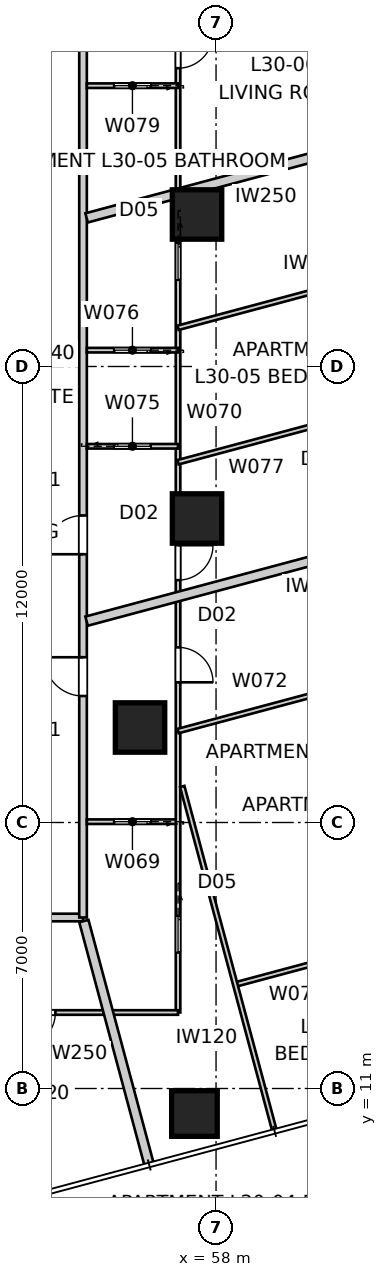
"""IFC4 building model, lengths in metres.
Left out: names, types, materials, properties, quantities, classifications, styles, units other than length and angle.
Written with IfcOpenShell. Run it as: python <this file> out.ifc"""

import sys

from ifc_helpers import new_model, si_unit, direction, frame, frame_2d, origin, origin_2d, place, context, subcontext, project, spatial, rectangle, extrude, element, fill, save


model = new_model("IFC4")
c1 = context("Model", 3, precision=1e-05, world=origin(), true_north=direction((0.0, 1.0)))
c2 = subcontext(c1, "Body", "Model", "MODEL_VIEW")
j1 = project(units=[si_unit("LENGTHUNIT", "METRE"), si_unit("PLANEANGLEUNIT", "RADIAN")], contexts=[c1])
p1 = place(None, origin())
s1 = spatial("IfcSite", under=j1, at=p1, CompositionType="ELEMENT")
p2 = place(p1, origin())
s2 = spatial("IfcBuilding", under=s1, at=p2, CompositionType="ELEMENT")
p3 = place(p2, frame((0.0, 0.0, 111.6)))
s3 = spatial("IfcBuildingStorey", under=s2, at=p3, CompositionType="ELEMENT", Elevation=111.6)
p4 = place(p3, frame((57.432, 10.342, -0.15), z_axis=(0.0, 0.0, 1.0), x_axis=(1.0, 0.0, 0.0)))
e1 = element("IfcColumn", 1, at=p4, inside=s3, PredefinedType="COLUMN", context=c2, shape_type="SweptSolid", body=[
    extrude(rectangle(XDim=1.2, YDim=1.2, at=origin_2d()), origin(), (0.0, 0.0, 1.0), 3.55),
])
for number, where, z_axis, x_axis in (
    (2, (57.5, 26.0, 0.0), (0.0, 0.0, 1.0), (1.0, 0.0, 0.0)),
    (3, (57.5, 34.0, 0.0), (0.0, 0.0, 1.0), (1.0, 0.0, 0.0)),
    (4, (56.0, 20.5, 0.0), (0.0, 0.0, 1.0), (1.0, 0.0, 0.0)),
):
    element("IfcColumn", number, at=place(p3, frame(where, z_axis=z_axis, x_axis=x_axis)), inside=s3, PredefinedType="COLUMN", context=c2, shape_type="SweptSolid", body=[
        extrude(rectangle(XDim=1.3, YDim=1.3, at=origin_2d()), origin(), (0.0, 0.0, 1.0), 3.4),
    ])
p5 = place(p3, frame((26.3, 15.5, 0.0), z_axis=(0.0, 0.0, 1.0), x_axis=(1.0, 0.0, 0.0)))
e5 = element("IfcWall", 5, at=p5, inside=s3, PredefinedType="PARTITIONING", context=c2, shape_type="SweptSolid", body=[
    extrude(rectangle(XDim=28.2, YDim=0.2, at=frame_2d((14.1, 0.0))), origin(), (0.0, 0.0, 1.0), 3.25),
])
p6 = place(p5, frame((21.474, 0.0, 0.0)))
e6 = element("IfcOpeningElement", 6, at=p6, cuts=e5, PredefinedType="OPENING", context=c2, shape_type="SweptSolid", body=[
    extrude(rectangle(XDim=1.02, YDim=2.34, at=frame_2d((0.51, 1.17))), frame((0.0, 0.11, 0.0), z_axis=(0.0, -1.0, 0.0), x_axis=(1.0, 0.0, 0.0)), (0.0, 0.0, 1.0), 0.22),
])
p7 = place(p5, frame((1.353, 0.0, 0.0)))
e7 = element("IfcOpeningElement", 7, at=p7, cuts=e5, PredefinedType="OPENING", context=c2, shape_type="SweptSolid", body=[
    extrude(rectangle(XDim=1.02, YDim=2.1, at=frame_2d((0.51, 1.05))), frame((0.0, 0.11, 0.0), z_axis=(0.0, -1.0, 0.0), x_axis=(1.0, 0.0, 0.0)), (0.0, 0.0, 1.0), 0.22),
])
p8 = place(p3, frame((54.5, 15.5, 0.0), z_axis=(0.0, 0.0, 1.0), x_axis=(0.0, 1.0, 0.0)))
e8 = element("IfcWall", 8, at=p8, inside=s3, PredefinedType="PARTITIONING", context=c2, shape_type="SweptSolid", body=[
    extrude(rectangle(XDim=29.0, YDim=0.2, at=frame_2d((14.5, 0.0))), origin(), (0.0, 0.0, 1.0), 3.25),
])
p9 = place(p8, frame((24.76, 0.0, 0.0)))
e9 = element("IfcOpeningElement", 9, at=p9, cuts=e8, PredefinedType="OPENING", context=c2, shape_type="SweptSolid", body=[
    extrude(rectangle(XDim=1.02, YDim=2.1, at=frame_2d((0.51, 1.05))), frame((0.0, 0.11, 0.0), z_axis=(0.0, -1.0, 0.0), x_axis=(1.0, 0.0, 0.0)), (0.0, 0.0, 1.0), 0.22),
])
p10 = place(p8, frame((5.829, 0.0, 0.0)))
e10 = element("IfcOpeningElement", 10, at=p10, cuts=e8, PredefinedType="OPENING", context=c2, shape_type="SweptSolid", body=[
    extrude(rectangle(XDim=1.02, YDim=2.34, at=frame_2d((0.51, 1.17))), frame((0.0, 0.11, 0.0), z_axis=(0.0, -1.0, 0.0), x_axis=(1.0, 0.0, 0.0)), (0.0, 0.0, 1.0), 0.22),
])
p11 = place(p8, frame((9.559, 0.0, 0.0)))
e11 = element("IfcOpeningElement", 11, at=p11, cuts=e8, PredefinedType="OPENING", context=c2, shape_type="SweptSolid", body=[
    extrude(rectangle(XDim=1.02, YDim=2.34, at=frame_2d((0.51, 1.17))), frame((0.0, 0.11, 0.0), z_axis=(0.0, -1.0, 0.0), x_axis=(1.0, 0.0, 0.0)), (0.0, 0.0, 1.0), 0.22),
])
p12 = place(p3, frame((56.242, 8.988, 0.0), z_axis=(0.0, 0.0, 1.0), x_axis=(-0.25880587229, 0.965929355837, 0.0)))
e12 = element("IfcWall", 12, at=p12, inside=s3, PredefinedType="PARTITIONING", context=c2, shape_type="SweptSolid", body=[
    extrude(rectangle(XDim=6.645, YDim=0.25, at=frame_2d((3.322, 0.0))), origin(), (0.0, 0.0, 1.0), 3.25),
])
p13 = place(p3, frame((63.665, 36.341, 0.0), z_axis=(0.0, 0.0, 1.0), x_axis=(-0.965927049013, -0.258814481793, 0.0)))
e13 = element("IfcWall", 13, at=p13, inside=s3, PredefinedType="PARTITIONING", context=c2, shape_type="SweptSolid", body=[
    extrude(rectangle(XDim=9.392, YDim=0.25, at=frame_2d((4.696, 0.0))), origin(), (0.0, 0.0, 1.0), 3.25),
])
p14 = place(p3, frame((66.318, 26.44, 0.0), z_axis=(0.0, 0.0, 1.0), x_axis=(-0.965924438766, -0.258824223352, 0.0)))
e14 = element("IfcWall", 14, at=p14, inside=s3, PredefinedType="PARTITIONING", context=c2, shape_type="SweptSolid", body=[
    extrude(rectangle(XDim=12.138, YDim=0.25, at=frame_2d((6.069, 0.0))), origin(), (0.0, 0.0, 1.0), 3.25),
])
p15 = place(p3, frame((55.046, 13.0, 0.0), z_axis=(0.0, 0.0, 1.0), x_axis=(-1.0, 0.0, 0.0)))
e15 = element("IfcWall", 15, at=p15, inside=s3, PredefinedType="PARTITIONING", context=c2, shape_type="SweptSolid", body=[
    extrude(rectangle(XDim=23.693, YDim=0.12, at=frame_2d((11.846, 0.0))), origin(), (0.0, 0.0, 1.0), 2.55),
])
p16 = place(p15, frame((8.262, 0.0, 0.0)))
e16 = element("IfcOpeningElement", 16, at=p16, cuts=e15, PredefinedType="OPENING", context=c2, shape_type="SweptSolid", body=[
    extrude(rectangle(XDim=0.92, YDim=2.34, at=frame_2d((0.46, 1.17))), frame((0.0, 0.07, 0.0), z_axis=(0.0, -1.0, 0.0), x_axis=(1.0, 0.0, 0.0)), (0.0, 0.0, 1.0), 0.14),
])
p17 = place(p15, frame((3.825, 0.0, 0.0)))
e17 = element("IfcOpeningElement", 17, at=p17, cuts=e15, PredefinedType="OPENING", context=c2, shape_type="SweptSolid", body=[
    extrude(rectangle(XDim=0.92, YDim=2.34, at=frame_2d((0.46, 1.17))), frame((0.0, 0.07, 0.0), z_axis=(0.0, -1.0, 0.0), x_axis=(1.0, 0.0, 0.0)), (0.0, 0.0, 1.0), 0.14),
])
p18 = place(p15, frame((1.274, 0.0, 0.0)))
e18 = element("IfcOpeningElement", 18, at=p18, cuts=e15, PredefinedType="OPENING", context=c2, shape_type="SweptSolid", body=[
    extrude(rectangle(XDim=0.92, YDim=2.34, at=frame_2d((0.46, 1.17))), frame((0.0, 0.07, 0.0), z_axis=(0.0, -1.0, 0.0), x_axis=(1.0, 0.0, 0.0)), (0.0, 0.0, 1.0), 0.14),
])
p19 = place(p15, frame((13.041, 0.0, 0.0)))
e19 = element("IfcOpeningElement", 19, at=p19, cuts=e15, PredefinedType="OPENING", context=c2, shape_type="SweptSolid", body=[
    extrude(rectangle(XDim=0.96, YDim=2.1, at=frame_2d((0.48, 1.05))), frame((0.0, 0.07, 0.0), z_axis=(0.0, -1.0, 0.0), x_axis=(1.0, 0.0, 0.0)), (0.0, 0.0, 1.0), 0.14),
])
p20 = place(p15, frame((21.917, 0.0, 0.0)))
e20 = element("IfcOpeningElement", 20, at=p20, cuts=e15, PredefinedType="OPENING", context=c2, shape_type="SweptSolid", body=[
    extrude(rectangle(XDim=0.96, YDim=2.1, at=frame_2d((0.48, 1.05))), frame((0.0, 0.07, 0.0), z_axis=(0.0, -1.0, 0.0), x_axis=(1.0, 0.0, 0.0)), (0.0, 0.0, 1.0), 0.14),
])
p21 = place(p3, frame((57.0, 18.021, 0.0), z_axis=(0.0, 0.0, 1.0), x_axis=(-1.0, 0.0, 0.0)))
e21 = element("IfcWall", 21, at=p21, inside=s3, PredefinedType="PARTITIONING", context=c2, shape_type="SweptSolid", body=[
    extrude(rectangle(XDim=2.4, YDim=0.12, at=frame_2d((1.2, 0.0))), origin(), (0.0, 0.0, 1.0), 3.25),
])
p22 = place(p21, frame((0.72, 0.0, 0.0)))
e22 = element("IfcOpeningElement", 22, at=p22, cuts=e21, PredefinedType="OPENING", context=c2, shape_type="SweptSolid", body=[
    extrude(rectangle(XDim=0.96, YDim=2.1, at=frame_2d((0.48, 1.05))), frame((0.0, 0.07, 0.0), z_axis=(0.0, -1.0, 0.0), x_axis=(1.0, 0.0, 0.0)), (0.0, 0.0, 1.0), 0.14),
])
p23 = place(p3, frame((57.0, 47.0, 0.0), z_axis=(0.0, 0.0, 1.0), x_axis=(0.0, -1.0, 0.0)))
e23 = element("IfcWall", 23, at=p23, inside=s3, PredefinedType="PARTITIONING", context=c2, shape_type="SweptSolid", body=[
    extrude(rectangle(XDim=34.0, YDim=0.12, at=frame_2d((17.0, 0.0))), origin(), (0.0, 0.0, 1.0), 2.55),
])
p24 = place(p23, frame((8.23, 0.0, 0.0)))
e24 = element("IfcOpeningElement", 24, at=p24, cuts=e23, PredefinedType="OPENING", context=c2, shape_type="SweptSolid", body=[
    extrude(rectangle(XDim=0.92, YDim=2.34, at=frame_2d((0.46, 1.17))), frame((0.0, 0.07, 0.0), z_axis=(0.0, -1.0, 0.0), x_axis=(1.0, 0.0, 0.0)), (0.0, 0.0, 1.0), 0.14),
])
p25 = place(p23, frame((3.192, 0.0, 0.0)))
e25 = element("IfcOpeningElement", 25, at=p25, cuts=e23, PredefinedType="OPENING", context=c2, shape_type="SweptSolid", body=[
    extrude(rectangle(XDim=0.92, YDim=2.34, at=frame_2d((0.46, 1.17))), frame((0.0, 0.07, 0.0), z_axis=(0.0, -1.0, 0.0), x_axis=(1.0, 0.0, 0.0)), (0.0, 0.0, 1.0), 0.14),
])
p26 = place(p23, frame((24.391, 0.0, 0.0)))
e26 = element("IfcOpeningElement", 26, at=p26, cuts=e23, PredefinedType="OPENING", context=c2, shape_type="SweptSolid", body=[
    extrude(rectangle(XDim=0.92, YDim=2.34, at=frame_2d((0.46, 1.17))), frame((0.0, 0.07, 0.0), z_axis=(0.0, -1.0, 0.0), x_axis=(1.0, 0.0, 0.0)), (0.0, 0.0, 1.0), 0.14),
])
p27 = place(p23, frame((21.702, 0.0, 0.0)))
e27 = element("IfcOpeningElement", 27, at=p27, cuts=e23, PredefinedType="OPENING", context=c2, shape_type="SweptSolid", body=[
    extrude(rectangle(XDim=0.92, YDim=2.34, at=frame_2d((0.46, 1.17))), frame((0.0, 0.07, 0.0), z_axis=(0.0, -1.0, 0.0), x_axis=(1.0, 0.0, 0.0)), (0.0, 0.0, 1.0), 0.14),
])
p28 = place(p23, frame((31.459, 0.0, 0.0)))
e28 = element("IfcOpeningElement", 28, at=p28, cuts=e23, PredefinedType="OPENING", context=c2, shape_type="SweptSolid", body=[
    extrude(rectangle(XDim=0.96, YDim=2.1, at=frame_2d((0.48, 1.05))), frame((0.0, 0.07, 0.0), z_axis=(0.0, -1.0, 0.0), x_axis=(1.0, 0.0, 0.0)), (0.0, 0.0, 1.0), 0.14),
])
p29 = place(p23, frame((13.759, 0.0, 0.0)))
e29 = element("IfcOpeningElement", 29, at=p29, cuts=e23, PredefinedType="OPENING", context=c2, shape_type="SweptSolid", body=[
    extrude(rectangle(XDim=0.96, YDim=2.1, at=frame_2d((0.48, 1.05))), frame((0.0, 0.07, 0.0), z_axis=(0.0, -1.0, 0.0), x_axis=(1.0, 0.0, 0.0)), (0.0, 0.0, 1.0), 0.14),
])
p30 = place(p3, frame((57.0, 13.0, 0.0), z_axis=(0.0, 0.0, 1.0), x_axis=(-1.0, 0.0, 0.0)))
e30 = element("IfcWall", 30, at=p30, inside=s3, PredefinedType="PARTITIONING", context=c2, shape_type="SweptSolid", body=[
    extrude(rectangle(XDim=1.833, YDim=0.12, at=frame_2d((0.917, 0.0))), origin(), (0.0, 0.0, 1.0), 3.25),
])
p31 = place(p3, frame((57.0, 20.406, 0.0), z_axis=(0.0, 0.0, 1.0), x_axis=(0.9659257847, 0.258819200315, 0.0)))
e31 = element("IfcWall", 31, at=p31, inside=s3, PredefinedType="PARTITIONING", context=c2, shape_type="SweptSolid", body=[
    extrude(rectangle(XDim=10.522, YDim=0.12, at=frame_2d((5.261, 0.0))), origin(), (0.0, 0.0, 1.0), 2.722),
])
p32 = place(p31, frame((4.821, 0.0, 0.0)))
e32 = element("IfcOpeningElement", 32, at=p32, cuts=e31, PredefinedType="OPENING", context=c2, shape_type="SweptSolid", body=[
    extrude(rectangle(XDim=0.92, YDim=2.34, at=frame_2d((0.46, 1.17))), frame((0.0, 0.07, 0.0), z_axis=(0.0, -1.0, 0.0), x_axis=(1.0, 0.0, 0.0)), (0.0, 0.0, 1.0), 0.14),
])
p33 = place(p3, frame((65.069, 15.494, 0.0), z_axis=(0.0, 0.0, 1.0), x_axis=(-0.965922865286, -0.258830095464, 0.0)))
e33 = element("IfcWall", 33, at=p33, inside=s3, PredefinedType="PARTITIONING", context=c2, shape_type="SweptSolid", body=[
    extrude(rectangle(XDim=6.793, YDim=0.12, at=frame_2d((3.396, 0.0))), origin(), (0.0, 0.0, 1.0), 3.25),
])
p34 = place(p33, frame((2.892, 0.0, 0.0)))
e34 = element("IfcOpeningElement", 34, at=p34, cuts=e33, PredefinedType="OPENING", context=c2, shape_type="SweptSolid", body=[
    extrude(rectangle(XDim=0.92, YDim=2.34, at=frame_2d((0.46, 1.17))), frame((0.0, 0.07, 0.0), z_axis=(0.0, -1.0, 0.0), x_axis=(1.0, 0.0, 0.0)), (0.0, 0.0, 1.0), 0.14),
])
p35 = place(p3, frame((59.532, 9.911, 0.0), z_axis=(0.0, 0.0, 1.0), x_axis=(-0.25881390457, 0.965927203676, 0.0)))
e35 = element("IfcWall", 35, at=p35, inside=s3, PredefinedType="PARTITIONING", context=c2, shape_type="SweptSolid", body=[
    extrude(rectangle(XDim=9.357, YDim=0.12, at=frame_2d((4.678, 0.0))), origin(), (0.0, 0.0, 1.0), 2.638),
])
p36 = place(p3, frame((54.6, 27.901, 0.0), z_axis=(0.0, 0.0, 1.0), x_axis=(1.0, 0.0, 0.0)))
e36 = element("IfcWall", 36, at=p36, inside=s3, PredefinedType="PARTITIONING", context=c2, shape_type="SweptSolid", body=[
    extrude(rectangle(XDim=2.4, YDim=0.12, at=frame_2d((1.2, 0.0))), origin(), (0.0, 0.0, 1.0), 3.25),
])
p37 = place(p36, frame((0.72, 0.0, 0.0)))
e37 = element("IfcOpeningElement", 37, at=p37, cuts=e36, PredefinedType="OPENING", context=c2, shape_type="SweptSolid", body=[
    extrude(rectangle(XDim=0.96, YDim=2.1, at=frame_2d((0.48, 1.05))), frame((0.0, 0.07, 0.0), z_axis=(0.0, -1.0, 0.0), x_axis=(1.0, 0.0, 0.0)), (0.0, 0.0, 1.0), 0.14),
])
p38 = place(p3, frame((57.0, 30.43, 0.0), z_axis=(0.0, 0.0, 1.0), x_axis=(-1.0, 0.0, 0.0)))
e38 = element("IfcWall", 38, at=p38, inside=s3, PredefinedType="PARTITIONING", context=c2, shape_type="SweptSolid", body=[
    extrude(rectangle(XDim=2.4, YDim=0.12, at=frame_2d((1.2, 0.0))), origin(), (0.0, 0.0, 1.0), 3.25),
])
p39 = place(p38, frame((0.72, 0.0, 0.0)))
e39 = element("IfcOpeningElement", 39, at=p39, cuts=e38, PredefinedType="OPENING", context=c2, shape_type="SweptSolid", body=[
    extrude(rectangle(XDim=0.96, YDim=2.1, at=frame_2d((0.48, 1.05))), frame((0.0, 0.07, 0.0), z_axis=(0.0, -1.0, 0.0), x_axis=(1.0, 0.0, 0.0)), (0.0, 0.0, 1.0), 0.14),
])
p40 = place(p3, frame((57.0, 27.481, 0.0), z_axis=(0.0, 0.0, 1.0), x_axis=(0.965925607751, 0.258819860698, 0.0)))
e40 = element("IfcWall", 40, at=p40, inside=s3, PredefinedType="PARTITIONING", context=c2, shape_type="SweptSolid", body=[
    extrude(rectangle(XDim=8.691, YDim=0.12, at=frame_2d((4.346, 0.0))), origin(), (0.0, 0.0, 1.0), 3.25),
])
p41 = place(p40, frame((3.906, 0.0, 0.0)))
e41 = element("IfcOpeningElement", 41, at=p41, cuts=e40, PredefinedType="OPENING", context=c2, shape_type="SweptSolid", body=[
    extrude(rectangle(XDim=0.92, YDim=2.34, at=frame_2d((0.46, 1.17))), frame((0.0, 0.07, 0.0), z_axis=(0.0, -1.0, 0.0), x_axis=(1.0, 0.0, 0.0)), (0.0, 0.0, 1.0), 0.14),
])
p42 = place(p3, frame((57.0, 31.018, 0.0), z_axis=(0.0, 0.0, 1.0), x_axis=(0.965927309482, 0.258813509689, 0.0)))
e42 = element("IfcWall", 42, at=p42, inside=s3, PredefinedType="PARTITIONING", context=c2, shape_type="SweptSolid", body=[
    extrude(rectangle(XDim=7.776, YDim=0.12, at=frame_2d((3.888, 0.0))), origin(), (0.0, 0.0, 1.0), 3.25),
])
p43 = place(p3, frame((57.0, 37.39, 0.0), z_axis=(0.0, 0.0, 1.0), x_axis=(-1.0, 0.0, 0.0)))
e43 = element("IfcWall", 43, at=p43, inside=s3, PredefinedType="PARTITIONING", context=c2, shape_type="SweptSolid", body=[
    extrude(rectangle(XDim=2.4, YDim=0.12, at=frame_2d((1.2, 0.0))), origin(), (0.0, 0.0, 1.0), 3.25),
])
p44 = place(p43, frame((0.72, 0.0, 0.0)))
e44 = element("IfcOpeningElement", 44, at=p44, cuts=e43, PredefinedType="OPENING", context=c2, shape_type="SweptSolid", body=[
    extrude(rectangle(XDim=0.96, YDim=2.1, at=frame_2d((0.48, 1.05))), frame((0.0, 0.07, 0.0), z_axis=(0.0, -1.0, 0.0), x_axis=(1.0, 0.0, 0.0)), (0.0, 0.0, 1.0), 0.14),
])
p45 = place(p10, origin())
e45 = element("IfcDoor", 45, at=p45, inside=s3, OperationType="SINGLE_SWING_RIGHT", PredefinedType="DOOR", context=c2, shape_type="SweptSolid", body=[
    extrude(rectangle(XDim=1.02, YDim=2.34, at=frame_2d((0.51, 1.17))), frame((0.0, 0.025, 0.0), z_axis=(0.0, -1.0, 0.0), x_axis=(1.0, 0.0, 0.0)), (0.0, 0.0, 1.0), 0.05),
])
fill(e10, e45)
p46 = place(p11, origin())
e46 = element("IfcDoor", 46, at=p46, inside=s3, OperationType="SINGLE_SWING_LEFT", PredefinedType="DOOR", context=c2, shape_type="SweptSolid", body=[
    extrude(rectangle(XDim=1.02, YDim=2.34, at=frame_2d((0.51, 1.17))), frame((0.0, 0.025, 0.0), z_axis=(0.0, -1.0, 0.0), x_axis=(1.0, 0.0, 0.0)), (0.0, 0.0, 1.0), 0.05),
])
fill(e11, e46)
p47 = place(p18, origin())
e47 = element("IfcDoor", 47, at=p47, inside=s3, OperationType="SINGLE_SWING_RIGHT", PredefinedType="DOOR", context=c2, shape_type="SweptSolid", body=[
    extrude(rectangle(XDim=0.92, YDim=2.34, at=frame_2d((0.46, 1.17))), frame((0.0, 0.025, 0.0), z_axis=(0.0, -1.0, 0.0), x_axis=(1.0, 0.0, 0.0)), (0.0, 0.0, 1.0), 0.05),
])
fill(e18, e47)
p48 = place(p24, origin())
e48 = element("IfcDoor", 48, at=p48, inside=s3, OperationType="SINGLE_SWING_LEFT", PredefinedType="DOOR", context=c2, shape_type="SweptSolid", body=[
    extrude(rectangle(XDim=0.92, YDim=2.34, at=frame_2d((0.46, 1.17))), frame((0.0, 0.025, 0.0), z_axis=(0.0, -1.0, 0.0), x_axis=(1.0, 0.0, 0.0)), (0.0, 0.0, 1.0), 0.05),
])
fill(e24, e48)
p49 = place(p44, origin())
e49 = element("IfcDoor", 49, at=p49, inside=s3, OperationType="SLIDING_TO_LEFT", PredefinedType="DOOR", context=c2, shape_type="SweptSolid", body=[
    extrude(rectangle(XDim=0.96, YDim=2.1, at=frame_2d((0.48, 1.05))), frame((0.0, 0.025, 0.0), z_axis=(0.0, -1.0, 0.0), x_axis=(1.0, 0.0, 0.0)), (0.0, 0.0, 1.0), 0.05),
])
fill(e44, e49)
p50 = place(p26, origin())
e50 = element("IfcDoor", 50, at=p50, inside=s3, OperationType="SINGLE_SWING_RIGHT", PredefinedType="DOOR", context=c2, shape_type="SweptSolid", body=[
    extrude(rectangle(XDim=0.92, YDim=2.34, at=frame_2d((0.46, 1.17))), frame((0.0, 0.025, 0.0), z_axis=(0.0, -1.0, 0.0), x_axis=(1.0, 0.0, 0.0)), (0.0, 0.0, 1.0), 0.05),
])
fill(e26, e50)
p51 = place(p22, origin())
e51 = element("IfcDoor", 51, at=p51, inside=s3, OperationType="SLIDING_TO_LEFT", PredefinedType="DOOR", context=c2, shape_type="SweptSolid", body=[
    extrude(rectangle(XDim=0.96, YDim=2.1, at=frame_2d((0.48, 1.05))), frame((0.0, 0.025, 0.0), z_axis=(0.0, -1.0, 0.0), x_axis=(1.0, 0.0, 0.0)), (0.0, 0.0, 1.0), 0.05),
])
fill(e22, e51)
p52 = place(p27, origin())
e52 = element("IfcDoor", 52, at=p52, inside=s3, OperationType="SINGLE_SWING_LEFT", PredefinedType="DOOR", context=c2, shape_type="SweptSolid", body=[
    extrude(rectangle(XDim=0.92, YDim=2.34, at=frame_2d((0.46, 1.17))), frame((0.0, 0.025, 0.0), z_axis=(0.0, -1.0, 0.0), x_axis=(1.0, 0.0, 0.0)), (0.0, 0.0, 1.0), 0.05),
])
fill(e27, e52)
p53 = place(p37, origin())
e53 = element("IfcDoor", 53, at=p53, inside=s3, OperationType="SLIDING_TO_LEFT", PredefinedType="DOOR", context=c2, shape_type="SweptSolid", body=[
    extrude(rectangle(XDim=0.96, YDim=2.1, at=frame_2d((0.48, 1.05))), frame((0.0, 0.025, 0.0), z_axis=(0.0, -1.0, 0.0), x_axis=(1.0, 0.0, 0.0)), (0.0, 0.0, 1.0), 0.05),
])
fill(e37, e53)
p54 = place(p28, origin())
e54 = element("IfcDoor", 54, at=p54, inside=s3, OperationType="SLIDING_TO_LEFT", PredefinedType="DOOR", context=c2, shape_type="SweptSolid", body=[
    extrude(rectangle(XDim=0.96, YDim=2.1, at=frame_2d((0.48, 1.05))), frame((0.0, 0.025, 0.0), z_axis=(0.0, -1.0, 0.0), x_axis=(1.0, 0.0, 0.0)), (0.0, 0.0, 1.0), 0.05),
])
fill(e28, e54)
p55 = place(p39, origin())
e55 = element("IfcDoor", 55, at=p55, inside=s3, OperationType="SLIDING_TO_LEFT", PredefinedType="DOOR", context=c2, shape_type="SweptSolid", body=[
    extrude(rectangle(XDim=0.96, YDim=2.1, at=frame_2d((0.48, 1.05))), frame((0.0, 0.025, 0.0), z_axis=(0.0, -1.0, 0.0), x_axis=(1.0, 0.0, 0.0)), (0.0, 0.0, 1.0), 0.05),
])
fill(e39, e55)
p56 = place(p29, origin())
e56 = element("IfcDoor", 56, at=p56, inside=s3, OperationType="SLIDING_TO_LEFT", PredefinedType="DOOR", context=c2, shape_type="SweptSolid", body=[
    extrude(rectangle(XDim=0.96, YDim=2.1, at=frame_2d((0.48, 1.05))), frame((0.0, 0.025, 0.0), z_axis=(0.0, -1.0, 0.0), x_axis=(1.0, 0.0, 0.0)), (0.0, 0.0, 1.0), 0.05),
])
fill(e29, e56)
save(model, sys.argv[1])
